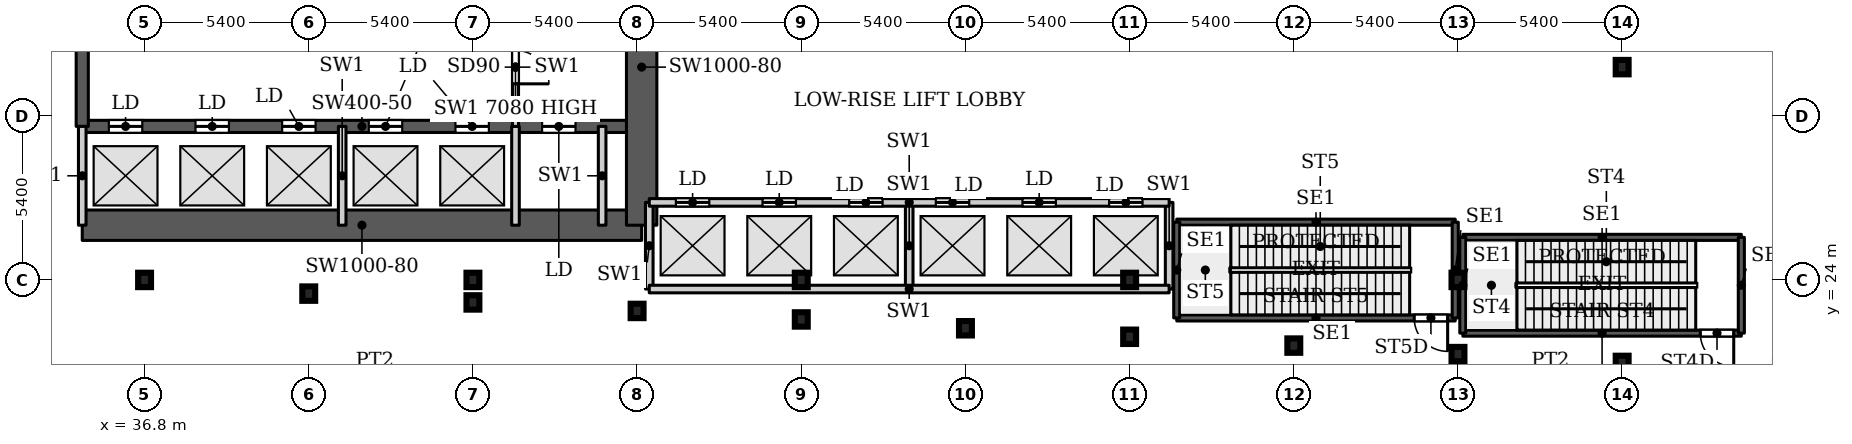
"""IFC4 building model, lengths in metres.
Left out: names, types, materials, properties, quantities, classifications, styles, units other than length and angle.
Written with IfcOpenShell. Run it as: python <this file> out.ifc"""

import sys

from ifc_helpers import new_model, si_unit, direction, frame, frame_2d, origin, origin_2d, place, context, subcontext, project, spatial, rectangle, i_section, extrude, source, transform, mapped, element, fill, save


model = new_model("IFC4")
c1 = context("Model", 3, precision=1e-05, world=origin(), true_north=direction((0.0, 1.0)))
c2 = subcontext(c1, "Body", "Model", "MODEL_VIEW")
j1 = project(units=[si_unit("LENGTHUNIT", "METRE"), si_unit("PLANEANGLEUNIT", "RADIAN")], contexts=[c1])
p1 = place(None, origin())
s1 = spatial("IfcSite", under=j1, at=p1, CompositionType="ELEMENT")
p2 = place(p1, origin())
s2 = spatial("IfcBuilding", under=s1, at=p2, CompositionType="ELEMENT")
p3 = place(p2, origin())
s3 = spatial("IfcBuildingStorey", under=s2, at=p3, CompositionType="ELEMENT", Elevation=0.0)
for number, where, z_axis, x_axis in (
    (1, (36.8, 24.0, 0.0), (0.0, 0.0, 1.0), (1.0, 0.0, 0.0)),
    (2, (47.6, 24.0, 0.0), (0.0, 0.0, 1.0), (1.0, 0.0, 0.0)),
    (3, (58.4, 24.0, 0.0), (0.0, 0.0, 1.0), (1.0, 0.0, 0.0)),
    (4, (69.2, 24.0, 0.0), (0.0, 0.0, 1.0), (1.0, 0.0, 0.0)),
    (5, (80.0, 24.0, 0.0), (0.0, 0.0, 1.0), (1.0, 0.0, 0.0)),
    (6, (85.4, 21.27, 0.0), (0.0, 0.0, 1.0), (1.0, 0.0, 0.0)),
    (7, (80.0, 21.56, 0.0), (0.0, 0.0, 1.0), (1.0, 0.0, 0.0)),
    (8, (74.6, 21.84, 0.0), (0.0, 0.0, 1.0), (1.0, 0.0, 0.0)),
    (9, (69.2, 22.13, 0.0), (0.0, 0.0, 1.0), (1.0, 0.0, 0.0)),
    (10, (63.8, 22.41, 0.0), (0.0, 0.0, 1.0), (1.0, 0.0, 0.0)),
    (11, (58.4, 22.7, 0.0), (0.0, 0.0, 1.0), (1.0, 0.0, 0.0)),
    (12, (53.0, 22.98, 0.0), (0.0, 0.0, 1.0), (1.0, 0.0, 0.0)),
    (13, (47.6, 23.26, 0.0), (0.0, 0.0, 1.0), (1.0, 0.0, 0.0)),
    (14, (42.2, 23.55, 0.0), (0.0, 0.0, 1.0), (1.0, 0.0, 0.0)),
    (15, (85.4, 31.0, 0.0), (0.0, 0.0, 1.0), (1.0, 0.0, 0.0)),
):
    element("IfcColumn", number, at=place(p3, frame(where, z_axis=z_axis, x_axis=x_axis)), inside=s3, PredefinedType="COLUMN", context=c2, shape_type="SweptSolid", body=[
        extrude(i_section(OverallWidth=0.424, OverallDepth=0.474, WebThickness=0.048, FlangeThickness=0.077, FilletRadius=0.014, at=origin_2d()), origin(), (0.0, 0.0, 1.0), 7.5),
    ])
p4 = place(p3, frame((34.75, 25.8, 0.0), z_axis=(0.0, 0.0, 1.0), x_axis=(1.0, 0.0, 0.0)))
e16 = element("IfcWall", 16, at=p4, inside=s3, PredefinedType="SHEAR", context=c2, shape_type="SweptSolid", body=[
    extrude(rectangle(XDim=18.4, YDim=1.0, at=frame_2d((9.2, 0.0))), origin(), (0.0, 0.0, 1.0), 7.5),
])
p5 = place(p3, frame((34.75, 29.05, 0.0), z_axis=(0.0, 0.0, 1.0), x_axis=(1.0, 0.0, 0.0)))
e17 = element("IfcWall", 17, at=p5, inside=s3, PredefinedType="SHEAR", context=c2, shape_type="SweptSolid", body=[
    extrude(rectangle(XDim=18.4, YDim=0.4, at=frame_2d((9.2, 0.0))), origin(), (0.0, 0.0, 1.0), 7.5),
])
p6 = place(p5, frame((0.875, 0.0, 0.0)))
e18 = element("IfcOpeningElement", 18, at=p6, cuts=e17, PredefinedType="OPENING", context=c2, shape_type="SweptSolid", body=[
    extrude(rectangle(XDim=1.1, YDim=2.2, at=frame_2d((0.55, 1.1))), frame((0.0, 0.21, 0.0), z_axis=(0.0, -1.0, 0.0), x_axis=(1.0, 0.0, 0.0)), (0.0, 0.0, 1.0), 0.42),
])
p7 = place(p5, frame((3.725, 0.0, 0.0)))
e19 = element("IfcOpeningElement", 19, at=p7, cuts=e17, PredefinedType="OPENING", context=c2, shape_type="SweptSolid", body=[
    extrude(rectangle(XDim=1.1, YDim=2.2, at=frame_2d((0.55, 1.1))), frame((0.0, 0.21, 0.0), z_axis=(0.0, -1.0, 0.0), x_axis=(1.0, 0.0, 0.0)), (0.0, 0.0, 1.0), 0.42),
])
p8 = place(p5, frame((6.575, 0.0, 0.0)))
e20 = element("IfcOpeningElement", 20, at=p8, cuts=e17, PredefinedType="OPENING", context=c2, shape_type="SweptSolid", body=[
    extrude(rectangle(XDim=1.1, YDim=2.2, at=frame_2d((0.55, 1.1))), frame((0.0, 0.21, 0.0), z_axis=(0.0, -1.0, 0.0), x_axis=(1.0, 0.0, 0.0)), (0.0, 0.0, 1.0), 0.42),
])
p9 = place(p5, frame((9.425, 0.0, 0.0)))
e21 = element("IfcOpeningElement", 21, at=p9, cuts=e17, PredefinedType="OPENING", context=c2, shape_type="SweptSolid", body=[
    extrude(rectangle(XDim=1.1, YDim=2.2, at=frame_2d((0.55, 1.1))), frame((0.0, 0.21, 0.0), z_axis=(0.0, -1.0, 0.0), x_axis=(1.0, 0.0, 0.0)), (0.0, 0.0, 1.0), 0.42),
])
p10 = place(p5, frame((12.275, 0.0, 0.0)))
e22 = element("IfcOpeningElement", 22, at=p10, cuts=e17, PredefinedType="OPENING", context=c2, shape_type="SweptSolid", body=[
    extrude(rectangle(XDim=1.1, YDim=2.2, at=frame_2d((0.55, 1.1))), frame((0.0, 0.21, 0.0), z_axis=(0.0, -1.0, 0.0), x_axis=(1.0, 0.0, 0.0)), (0.0, 0.0, 1.0), 0.42),
])
p11 = place(p5, frame((15.125, 0.0, 0.0)))
e23 = element("IfcOpeningElement", 23, at=p11, cuts=e17, PredefinedType="OPENING", context=c2, shape_type="SweptSolid", body=[
    extrude(rectangle(XDim=1.1, YDim=2.2, at=frame_2d((0.55, 1.1))), frame((0.0, 0.21, 0.0), z_axis=(0.0, -1.0, 0.0), x_axis=(1.0, 0.0, 0.0)), (0.0, 0.0, 1.0), 0.42),
])
p12 = place(p3, frame((34.75, 29.05, 0.0), z_axis=(0.0, 0.0, 1.0), x_axis=(0.0, 1.0, 0.0)))
e24 = element("IfcWall", 24, at=p12, inside=s3, PredefinedType="SHEAR", context=c2, shape_type="SweptSolid", body=[
    extrude(rectangle(XDim=18.45, YDim=0.4, at=frame_2d((9.225, 0.0))), origin(), (0.0, 0.0, 1.0), 7.5),
])
p13 = place(p12, frame((8.025, 0.0, 0.0)))
e25 = element("IfcOpeningElement", 25, at=p13, cuts=e24, PredefinedType="OPENING", context=c2, shape_type="SweptSolid", body=[
    extrude(rectangle(XDim=1.1, YDim=2.2, at=frame_2d((0.55, 1.1))), frame((0.0, 0.21, 0.0), z_axis=(0.0, -1.0, 0.0), x_axis=(1.0, 0.0, 0.0)), (0.0, 0.0, 1.0), 0.42),
])
p14 = place(p12, frame((10.875, 0.0, 0.0)))
e26 = element("IfcOpeningElement", 26, at=p14, cuts=e24, PredefinedType="OPENING", context=c2, shape_type="SweptSolid", body=[
    extrude(rectangle(XDim=1.1, YDim=2.2, at=frame_2d((0.55, 1.1))), frame((0.0, 0.21, 0.0), z_axis=(0.0, -1.0, 0.0), x_axis=(1.0, 0.0, 0.0)), (0.0, 0.0, 1.0), 0.42),
])
p15 = place(p12, frame((13.725, 0.0, 0.0)))
e27 = element("IfcOpeningElement", 27, at=p15, cuts=e24, PredefinedType="OPENING", context=c2, shape_type="SweptSolid", body=[
    extrude(rectangle(XDim=1.1, YDim=2.2, at=frame_2d((0.55, 1.1))), frame((0.0, 0.21, 0.0), z_axis=(0.0, -1.0, 0.0), x_axis=(1.0, 0.0, 0.0)), (0.0, 0.0, 1.0), 0.42),
])
p16 = place(p12, frame((15.95, 0.0, 0.0)))
e28 = element("IfcOpeningElement", 28, at=p16, cuts=e24, PredefinedType="OPENING", context=c2, shape_type="SweptSolid", body=[
    extrude(rectangle(XDim=1.1, YDim=2.2, at=frame_2d((0.55, 1.1))), frame((0.0, 0.21, 0.0), z_axis=(0.0, -1.0, 0.0), x_axis=(1.0, 0.0, 0.0)), (0.0, 0.0, 1.0), 0.42),
])
p17 = place(p3, frame((53.15, 25.8, 0.0), z_axis=(0.0, 0.0, 1.0), x_axis=(0.0, 1.0, 0.0)))
e29 = element("IfcWall", 29, at=p17, inside=s3, PredefinedType="SHEAR", context=c2, shape_type="SweptSolid", body=[
    extrude(rectangle(XDim=10.4, YDim=1.0, at=frame_2d((5.2, 0.0))), origin(), (0.0, 0.0, 1.0), 7.5),
])
p18 = place(p3, frame((80.16, 22.25, 0.0), z_axis=(0.0, 0.0, 1.0), x_axis=(1.0, 0.0, 0.0)))
e30 = element("IfcWall", 30, at=p18, inside=s3, PredefinedType="SHEAR", context=c2, shape_type="SweptSolid", body=[
    extrude(rectangle(XDim=9.16, YDim=0.2, at=frame_2d((4.58, 0.0))), origin(), (0.0, 0.0, 1.0), 7.5),
])
p19 = place(p18, frame((7.81, 0.0, 0.0)))
e31 = element("IfcOpeningElement", 31, at=p19, cuts=e30, PredefinedType="OPENING", context=c2, shape_type="SweptSolid", body=[
    extrude(rectangle(XDim=1.1, YDim=2.2, at=frame_2d((0.55, 1.1))), frame((0.0, 0.11, 0.0), z_axis=(0.0, -1.0, 0.0), x_axis=(1.0, 0.0, 0.0)), (0.0, 0.0, 1.0), 0.22),
])
p20 = place(p3, frame((80.16, 25.4, 0.0), z_axis=(0.0, 0.0, 1.0), x_axis=(1.0, 0.0, 0.0)))
e32 = element("IfcWall", 32, at=p20, inside=s3, PredefinedType="SHEAR", context=c2, shape_type="SweptSolid", body=[
    extrude(rectangle(XDim=9.16, YDim=0.2, at=frame_2d((4.58, 0.0))), origin(), (0.0, 0.0, 1.0), 7.5),
])
for number, where, z_axis, x_axis in (
    (33, (80.16, 22.25, 0.0), (0.0, 0.0, 1.0), (0.0, 1.0, 0.0)),
    (34, (89.32, 22.25, 0.0), (0.0, 0.0, 1.0), (0.0, 1.0, 0.0)),
):
    element("IfcWall", number, at=place(p3, frame(where, z_axis=z_axis, x_axis=x_axis)), inside=s3, PredefinedType="SHEAR", context=c2, shape_type="SweptSolid", body=[
        extrude(rectangle(XDim=3.15, YDim=0.2, at=frame_2d((1.575, 0.0))), origin(), (0.0, 0.0, 1.0), 7.5),
    ])
p21 = place(p3, frame((70.75, 22.75, 0.0), z_axis=(0.0, 0.0, 1.0), x_axis=(1.0, 0.0, 0.0)))
e35 = element("IfcWall", 35, at=p21, inside=s3, PredefinedType="SHEAR", context=c2, shape_type="SweptSolid", body=[
    extrude(rectangle(XDim=9.16, YDim=0.2, at=frame_2d((4.58, 0.0))), origin(), (0.0, 0.0, 1.0), 7.5),
])
p22 = place(p21, frame((7.81, 0.0, 0.0)))
e36 = element("IfcOpeningElement", 36, at=p22, cuts=e35, PredefinedType="OPENING", context=c2, shape_type="SweptSolid", body=[
    extrude(rectangle(XDim=1.1, YDim=2.2, at=frame_2d((0.55, 1.1))), frame((0.0, 0.11, 0.0), z_axis=(0.0, -1.0, 0.0), x_axis=(1.0, 0.0, 0.0)), (0.0, 0.0, 1.0), 0.22),
])
p23 = place(p3, frame((70.75, 25.9, 0.0), z_axis=(0.0, 0.0, 1.0), x_axis=(1.0, 0.0, 0.0)))
e37 = element("IfcWall", 37, at=p23, inside=s3, PredefinedType="SHEAR", context=c2, shape_type="SweptSolid", body=[
    extrude(rectangle(XDim=9.16, YDim=0.2, at=frame_2d((4.58, 0.0))), origin(), (0.0, 0.0, 1.0), 7.5),
])
for number, where, z_axis, x_axis in (
    (38, (70.75, 22.75, 0.0), (0.0, 0.0, 1.0), (0.0, 1.0, 0.0)),
    (39, (79.91, 22.75, 0.0), (0.0, 0.0, 1.0), (0.0, 1.0, 0.0)),
):
    element("IfcWall", number, at=place(p3, frame(where, z_axis=z_axis, x_axis=x_axis)), inside=s3, PredefinedType="SHEAR", context=c2, shape_type="SweptSolid", body=[
        extrude(rectangle(XDim=3.15, YDim=0.2, at=frame_2d((1.575, 0.0))), origin(), (0.0, 0.0, 1.0), 7.5),
    ])
for number, where, z_axis, x_axis in (
    (40, (34.75, 25.8, 0.0), (0.0, 0.0, 1.0), (0.0, 1.0, 0.0)),
    (41, (43.3, 25.8, 0.0), (0.0, 0.0, 1.0), (0.0, 1.0, 0.0)),
    (42, (49.0, 25.8, 0.0), (0.0, 0.0, 1.0), (0.0, 1.0, 0.0)),
    (43, (51.85, 25.8, 0.0), (0.0, 0.0, 1.0), (0.0, 1.0, 0.0)),
):
    element("IfcWall", number, at=place(p3, frame(where, z_axis=z_axis, x_axis=x_axis)), inside=s3, PredefinedType="PARTITIONING", context=c2, shape_type="SweptSolid", body=[
        extrude(rectangle(XDim=3.25, YDim=0.25, at=frame_2d((1.625, 0.0))), origin(), (0.0, 0.0, 1.0), 7.5),
    ])
for number, where, z_axis, x_axis in (
    (44, (53.4, 23.7, 0.0), (0.0, 0.0, 1.0), (0.0, 1.0, 0.0)),
    (45, (61.95, 23.7, 0.0), (0.0, 0.0, 1.0), (0.0, 1.0, 0.0)),
    (46, (70.5, 23.7, 0.0), (0.0, 0.0, 1.0), (0.0, 1.0, 0.0)),
):
    element("IfcWall", number, at=place(p3, frame(where, z_axis=z_axis, x_axis=x_axis)), inside=s3, PredefinedType="PARTITIONING", context=c2, shape_type="SweptSolid", body=[
        extrude(rectangle(XDim=2.85, YDim=0.25, at=frame_2d((1.425, 0.0))), origin(), (0.0, 0.0, 1.0), 7.5),
    ])
p24 = place(p3, frame((53.4, 23.7, 0.0), z_axis=(0.0, 0.0, 1.0), x_axis=(1.0, 0.0, 0.0)))
e47 = element("IfcWall", 47, at=p24, inside=s3, PredefinedType="PARTITIONING", context=c2, shape_type="SweptSolid", body=[
    extrude(rectangle(XDim=17.1, YDim=0.25, at=frame_2d((8.55, 0.0))), origin(), (0.0, 0.0, 1.0), 7.5),
])
p25 = place(p3, frame((53.4, 26.55, 0.0), z_axis=(0.0, 0.0, 1.0), x_axis=(1.0, 0.0, 0.0)))
e48 = element("IfcWall", 48, at=p25, inside=s3, PredefinedType="PARTITIONING", context=c2, shape_type="SweptSolid", body=[
    extrude(rectangle(XDim=17.1, YDim=0.25, at=frame_2d((8.55, 0.0))), origin(), (0.0, 0.0, 1.0), 7.5),
])
p26 = place(p25, frame((0.875, 0.0, 0.0)))
e49 = element("IfcOpeningElement", 49, at=p26, cuts=e48, PredefinedType="OPENING", context=c2, shape_type="SweptSolid", body=[
    extrude(rectangle(XDim=1.1, YDim=2.2, at=frame_2d((0.55, 1.1))), frame((0.0, 0.135, 0.0), z_axis=(0.0, -1.0, 0.0), x_axis=(1.0, 0.0, 0.0)), (0.0, 0.0, 1.0), 0.27),
])
p27 = place(p25, frame((3.725, 0.0, 0.0)))
e50 = element("IfcOpeningElement", 50, at=p27, cuts=e48, PredefinedType="OPENING", context=c2, shape_type="SweptSolid", body=[
    extrude(rectangle(XDim=1.1, YDim=2.2, at=frame_2d((0.55, 1.1))), frame((0.0, 0.135, 0.0), z_axis=(0.0, -1.0, 0.0), x_axis=(1.0, 0.0, 0.0)), (0.0, 0.0, 1.0), 0.27),
])
p28 = place(p25, frame((6.575, 0.0, 0.0)))
e51 = element("IfcOpeningElement", 51, at=p28, cuts=e48, PredefinedType="OPENING", context=c2, shape_type="SweptSolid", body=[
    extrude(rectangle(XDim=1.1, YDim=2.2, at=frame_2d((0.55, 1.1))), frame((0.0, 0.135, 0.0), z_axis=(0.0, -1.0, 0.0), x_axis=(1.0, 0.0, 0.0)), (0.0, 0.0, 1.0), 0.27),
])
p29 = place(p25, frame((9.425, 0.0, 0.0)))
e52 = element("IfcOpeningElement", 52, at=p29, cuts=e48, PredefinedType="OPENING", context=c2, shape_type="SweptSolid", body=[
    extrude(rectangle(XDim=1.1, YDim=2.2, at=frame_2d((0.55, 1.1))), frame((0.0, 0.135, 0.0), z_axis=(0.0, -1.0, 0.0), x_axis=(1.0, 0.0, 0.0)), (0.0, 0.0, 1.0), 0.27),
])
p30 = place(p25, frame((12.275, 0.0, 0.0)))
e53 = element("IfcOpeningElement", 53, at=p30, cuts=e48, PredefinedType="OPENING", context=c2, shape_type="SweptSolid", body=[
    extrude(rectangle(XDim=1.1, YDim=2.2, at=frame_2d((0.55, 1.1))), frame((0.0, 0.135, 0.0), z_axis=(0.0, -1.0, 0.0), x_axis=(1.0, 0.0, 0.0)), (0.0, 0.0, 1.0), 0.27),
])
p31 = place(p25, frame((15.125, 0.0, 0.0)))
e54 = element("IfcOpeningElement", 54, at=p31, cuts=e48, PredefinedType="OPENING", context=c2, shape_type="SweptSolid", body=[
    extrude(rectangle(XDim=1.1, YDim=2.2, at=frame_2d((0.55, 1.1))), frame((0.0, 0.135, 0.0), z_axis=(0.0, -1.0, 0.0), x_axis=(1.0, 0.0, 0.0)), (0.0, 0.0, 1.0), 0.27),
])
p32 = place(p3, frame((49.0, 29.05, 0.0), z_axis=(0.0, 0.0, 1.0), x_axis=(0.0, 1.0, 0.0)))
e55 = element("IfcWall", 55, at=p32, inside=s3, PredefinedType="PARTITIONING", context=c2, shape_type="SweptSolid", body=[
    extrude(rectangle(XDim=3.9, YDim=0.2, at=frame_2d((1.95, 0.0))), origin(), (0.0, 0.0, 1.0), 7.08),
])
p33 = place(p32, frame((1.4, 0.0, 0.0)))
e56 = element("IfcOpeningElement", 56, at=p33, cuts=e55, PredefinedType="OPENING", context=c2, shape_type="SweptSolid", body=[
    extrude(rectangle(XDim=1.1, YDim=2.2, at=frame_2d((0.55, 1.1))), frame((0.0, 0.11, 0.0), z_axis=(0.0, -1.0, 0.0), x_axis=(1.0, 0.0, 0.0)), (0.0, 0.0, 1.0), 0.22),
])
m1 = source(origin(), c2, "Body", "SweptSolid", [
    extrude(rectangle(XDim=1.1, YDim=2.2, at=frame_2d((0.55, 1.1))), frame((0.0, 0.025, 0.0), z_axis=(0.0, -1.0, 0.0), x_axis=(1.0, 0.0, 0.0)), (0.0, 0.0, 1.0), 0.05),
])
p34 = place(p26, origin())
e57 = element("IfcDoor", 57, at=p34, inside=s3, OperationType="SLIDING_TO_LEFT", PredefinedType="DOOR", context=c2, shape_type="MappedRepresentation", body=[
    mapped(m1, transform((0.0, 0.0, 0.0), x_axis=(1.0, 0.0, 0.0), y_axis=(0.0, 1.0, 0.0), z_axis=(0.0, 0.0, 1.0), scale=1.0)),
])
fill(e49, e57)
p35 = place(p27, origin())
e58 = element("IfcDoor", 58, at=p35, inside=s3, OperationType="SLIDING_TO_LEFT", PredefinedType="DOOR", context=c2, shape_type="MappedRepresentation", body=[
    mapped(m1, transform((0.0, 0.0, 0.0), x_axis=(1.0, 0.0, 0.0), y_axis=(0.0, 1.0, 0.0), z_axis=(0.0, 0.0, 1.0), scale=1.0)),
])
fill(e50, e58)
p36 = place(p28, origin())
e59 = element("IfcDoor", 59, at=p36, inside=s3, OperationType="SLIDING_TO_LEFT", PredefinedType="DOOR", context=c2, shape_type="MappedRepresentation", body=[
    mapped(m1, transform((0.0, 0.0, 0.0), x_axis=(1.0, 0.0, 0.0), y_axis=(0.0, 1.0, 0.0), z_axis=(0.0, 0.0, 1.0), scale=1.0)),
])
fill(e51, e59)
p37 = place(p29, origin())
e60 = element("IfcDoor", 60, at=p37, inside=s3, OperationType="SLIDING_TO_LEFT", PredefinedType="DOOR", context=c2, shape_type="MappedRepresentation", body=[
    mapped(m1, transform((0.0, 0.0, 0.0), x_axis=(1.0, 0.0, 0.0), y_axis=(0.0, 1.0, 0.0), z_axis=(0.0, 0.0, 1.0), scale=1.0)),
])
fill(e52, e60)
p38 = place(p30, origin())
e61 = element("IfcDoor", 61, at=p38, inside=s3, OperationType="SLIDING_TO_LEFT", PredefinedType="DOOR", context=c2, shape_type="MappedRepresentation", body=[
    mapped(m1, transform((0.0, 0.0, 0.0), x_axis=(1.0, 0.0, 0.0), y_axis=(0.0, 1.0, 0.0), z_axis=(0.0, 0.0, 1.0), scale=1.0)),
])
fill(e53, e61)
p39 = place(p31, origin())
e62 = element("IfcDoor", 62, at=p39, inside=s3, OperationType="SLIDING_TO_LEFT", PredefinedType="DOOR", context=c2, shape_type="MappedRepresentation", body=[
    mapped(m1, transform((0.0, 0.0, 0.0), x_axis=(1.0, 0.0, 0.0), y_axis=(0.0, 1.0, 0.0), z_axis=(0.0, 0.0, 1.0), scale=1.0)),
])
fill(e54, e62)
p40 = place(p6, origin())
e63 = element("IfcDoor", 63, at=p40, inside=s3, OperationType="SLIDING_TO_LEFT", PredefinedType="DOOR", context=c2, shape_type="MappedRepresentation", body=[
    mapped(m1, transform((0.0, 0.0, 0.0), x_axis=(1.0, 0.0, 0.0), y_axis=(0.0, 1.0, 0.0), z_axis=(0.0, 0.0, 1.0), scale=1.0)),
])
fill(e18, e63)
p41 = place(p7, origin())
e64 = element("IfcDoor", 64, at=p41, inside=s3, OperationType="SLIDING_TO_LEFT", PredefinedType="DOOR", context=c2, shape_type="MappedRepresentation", body=[
    mapped(m1, transform((0.0, 0.0, 0.0), x_axis=(1.0, 0.0, 0.0), y_axis=(0.0, 1.0, 0.0), z_axis=(0.0, 0.0, 1.0), scale=1.0)),
])
fill(e19, e64)
p42 = place(p8, origin())
e65 = element("IfcDoor", 65, at=p42, inside=s3, OperationType="SLIDING_TO_LEFT", PredefinedType="DOOR", context=c2, shape_type="MappedRepresentation", body=[
    mapped(m1, transform((0.0, 0.0, 0.0), x_axis=(1.0, 0.0, 0.0), y_axis=(0.0, 1.0, 0.0), z_axis=(0.0, 0.0, 1.0), scale=1.0)),
])
fill(e20, e65)
p43 = place(p9, origin())
e66 = element("IfcDoor", 66, at=p43, inside=s3, OperationType="SLIDING_TO_LEFT", PredefinedType="DOOR", context=c2, shape_type="MappedRepresentation", body=[
    mapped(m1, transform((0.0, 0.0, 0.0), x_axis=(1.0, 0.0, 0.0), y_axis=(0.0, 1.0, 0.0), z_axis=(0.0, 0.0, 1.0), scale=1.0)),
])
fill(e21, e66)
p44 = place(p10, origin())
e67 = element("IfcDoor", 67, at=p44, inside=s3, OperationType="SLIDING_TO_LEFT", PredefinedType="DOOR", context=c2, shape_type="MappedRepresentation", body=[
    mapped(m1, transform((0.0, 0.0, 0.0), x_axis=(1.0, 0.0, 0.0), y_axis=(0.0, 1.0, 0.0), z_axis=(0.0, 0.0, 1.0), scale=1.0)),
])
fill(e22, e67)
p45 = place(p11, origin())
e68 = element("IfcDoor", 68, at=p45, inside=s3, OperationType="SLIDING_TO_LEFT", PredefinedType="DOOR", context=c2, shape_type="MappedRepresentation", body=[
    mapped(m1, transform((0.0, 0.0, 0.0), x_axis=(1.0, 0.0, 0.0), y_axis=(0.0, 1.0, 0.0), z_axis=(0.0, 0.0, 1.0), scale=1.0)),
])
fill(e23, e68)
m2 = source(origin(), c2, "Body", "SweptSolid", [
    extrude(rectangle(XDim=1.1, YDim=2.2, at=frame_2d((0.55, 1.1))), frame((0.0, 0.025, 0.0), z_axis=(0.0, -1.0, 0.0), x_axis=(1.0, 0.0, 0.0)), (0.0, 0.0, 1.0), 0.05),
])
p46 = place(p33, origin())
e69 = element("IfcDoor", 69, at=p46, inside=s3, OperationType="SINGLE_SWING_RIGHT", PredefinedType="DOOR", context=c2, shape_type="MappedRepresentation", body=[
    mapped(m2, transform((0.0, 0.0, 0.0), x_axis=(1.0, 0.0, 0.0), y_axis=(0.0, 1.0, 0.0), z_axis=(0.0, 0.0, 1.0), scale=1.0)),
])
fill(e56, e69)
p47 = place(p19, origin())
e70 = element("IfcDoor", 70, at=p47, inside=s3, OperationType="SINGLE_SWING_RIGHT", PredefinedType="DOOR", context=c2, shape_type="MappedRepresentation", body=[
    mapped(m2, transform((0.0, 0.0, 0.0), x_axis=(1.0, 0.0, 0.0), y_axis=(0.0, 1.0, 0.0), z_axis=(0.0, 0.0, 1.0), scale=1.0)),
])
fill(e31, e70)
p48 = place(p22, origin())
e71 = element("IfcDoor", 71, at=p48, inside=s3, OperationType="SINGLE_SWING_RIGHT", PredefinedType="DOOR", context=c2, shape_type="MappedRepresentation", body=[
    mapped(m2, transform((0.0, 0.0, 0.0), x_axis=(1.0, 0.0, 0.0), y_axis=(0.0, 1.0, 0.0), z_axis=(0.0, 0.0, 1.0), scale=1.0)),
])
fill(e36, e71)
save(model, sys.argv[1])
